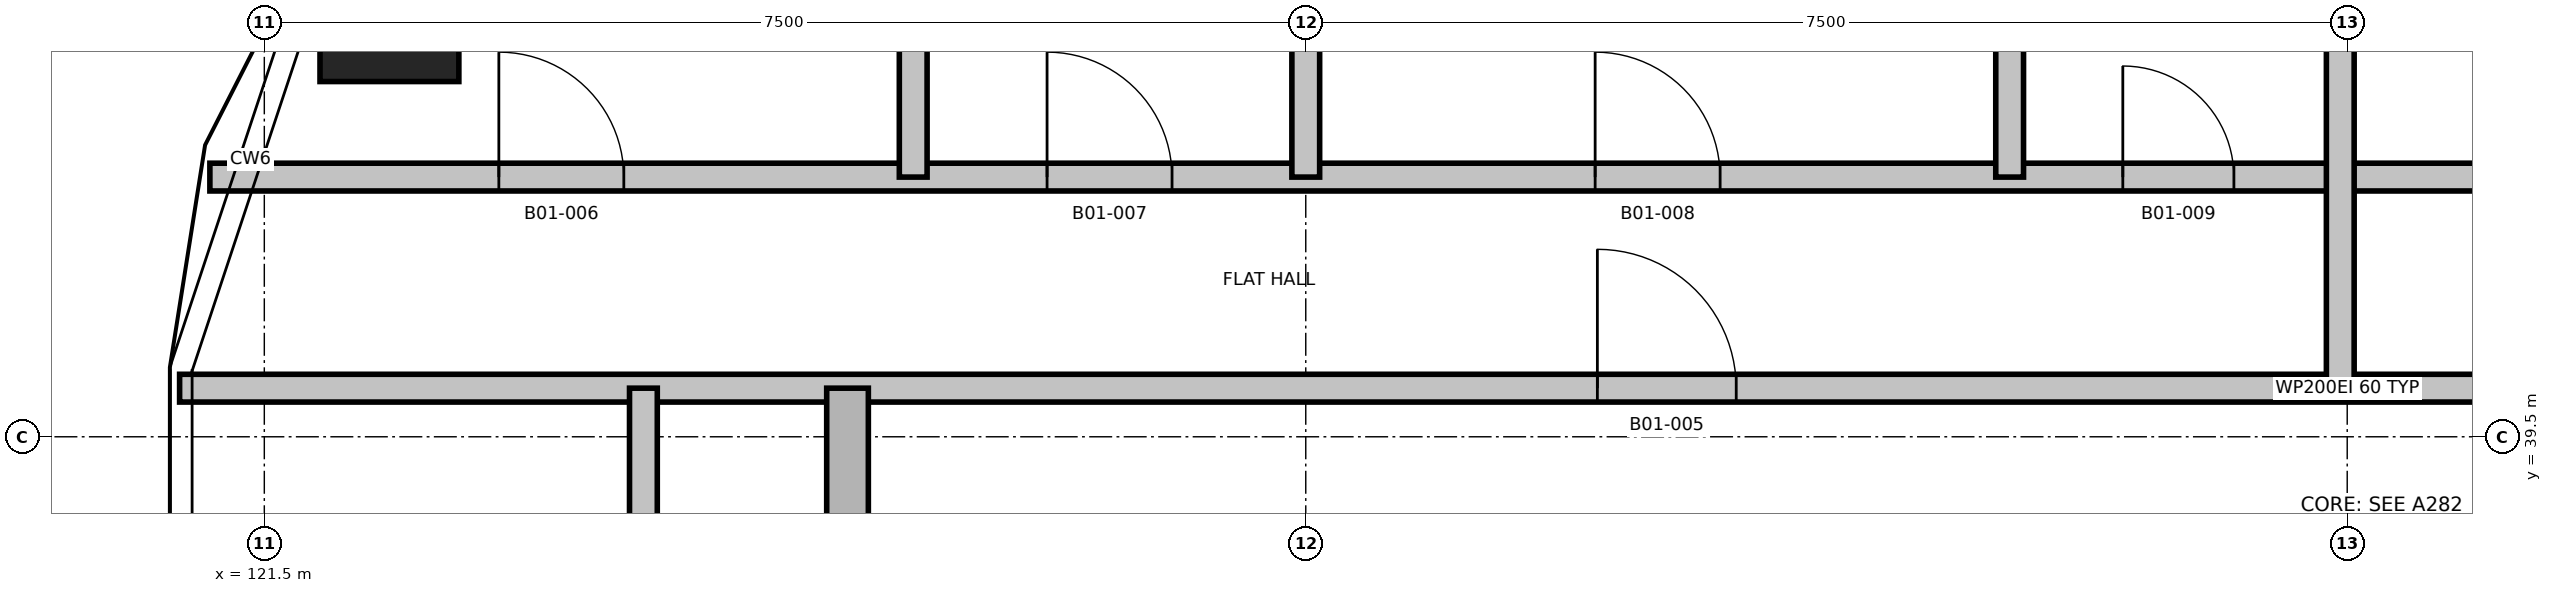
"""IFC4 building model, lengths in metres.
Left out: names, types, materials, properties, quantities, classifications, styles, units other than length and angle.
Written with IfcOpenShell. Run it as: python <this file> out.ifc"""

import sys

from ifc_helpers import new_model, si_unit, direction, frame, frame_2d, origin, origin_2d, place, context, subcontext, project, spatial, rectangle, extrude, element, fill, save


model = new_model("IFC4")
c1 = context("Model", 3, precision=1e-05, world=origin(), true_north=direction((0.0, 1.0)))
c2 = subcontext(c1, "Body", "Model", "MODEL_VIEW")
j1 = project(units=[si_unit("LENGTHUNIT", "METRE"), si_unit("PLANEANGLEUNIT", "RADIAN")], contexts=[c1])
p1 = place(None, origin())
s1 = spatial("IfcSite", under=j1, at=p1, CompositionType="ELEMENT")
p2 = place(p1, origin())
s2 = spatial("IfcBuilding", under=s1, at=p2, CompositionType="ELEMENT")
p3 = place(p2, frame((0.0, 0.0, 37.2)))
s3 = spatial("IfcBuildingStorey", under=s2, at=p3, CompositionType="ELEMENT", Elevation=37.2)
p4 = place(p3, frame((122.401, 42.558, 0.0), z_axis=(0.0, 0.0, 1.0), x_axis=(1.0, 0.0, 0.0)))
e1 = element("IfcColumn", 1, at=p4, inside=s3, PredefinedType="COLUMN", context=c2, shape_type="SweptSolid", body=[
    extrude(rectangle(XDim=1.0, YDim=1.0, at=origin_2d()), origin(), (0.0, 0.0, 1.0), 3.7),
])
p5 = place(p3, frame((120.89, 39.85, 0.0), z_axis=(0.0, 0.0, 1.0), x_axis=(1.0, 0.0, 0.0)))
e2 = element("IfcWall", 2, at=p5, inside=s3, PredefinedType="PARTITIONING", context=c2, shape_type="SweptSolid", body=[
    extrude(rectangle(XDim=31.22, YDim=0.2, at=frame_2d((15.61, 0.0))), origin(), (0.0, 0.0, 1.0), 3.4),
])
p6 = place(p5, frame((10.21, 0.0, 0.0)))
e3 = element("IfcOpeningElement", 3, at=p6, cuts=e2, PredefinedType="OPENING", context=c2, shape_type="SweptSolid", body=[
    extrude(rectangle(XDim=1.0, YDim=2.1, at=frame_2d((0.5, 1.05))), frame((0.0, 0.11, 0.0), z_axis=(0.0, -1.0, 0.0), x_axis=(1.0, 0.0, 0.0)), (0.0, 0.0, 1.0), 0.22),
])
p7 = place(p5, frame((20.01, 0.0, 0.0)))
e4 = element("IfcOpeningElement", 4, at=p7, cuts=e2, PredefinedType="OPENING", context=c2, shape_type="SweptSolid", body=[
    extrude(rectangle(XDim=1.0, YDim=2.1, at=frame_2d((0.5, 1.05))), frame((0.0, 0.11, 0.0), z_axis=(0.0, -1.0, 0.0), x_axis=(1.0, 0.0, 0.0)), (0.0, 0.0, 1.0), 0.22),
])
p8 = place(p3, frame((121.108, 41.37, 0.0), z_axis=(0.0, 0.0, 1.0), x_axis=(1.0, 0.0, 0.0)))
e5 = element("IfcWall", 5, at=p8, inside=s3, PredefinedType="PARTITIONING", context=c2, shape_type="SweptSolid", body=[
    extrude(rectangle(XDim=30.784, YDim=0.2, at=frame_2d((15.392, 0.0))), origin(), (0.0, 0.0, 1.0), 3.4),
])
p9 = place(p8, frame((2.081, 0.0, 0.0)))
e6 = element("IfcOpeningElement", 6, at=p9, cuts=e5, PredefinedType="OPENING", context=c2, shape_type="SweptSolid", body=[
    extrude(rectangle(XDim=0.9, YDim=2.1, at=frame_2d((0.45, 1.05))), frame((0.0, 0.11, 0.0), z_axis=(0.0, -1.0, 0.0), x_axis=(1.0, 0.0, 0.0)), (0.0, 0.0, 1.0), 0.22),
])
p10 = place(p8, frame((6.029, 0.0, 0.0)))
e7 = element("IfcOpeningElement", 7, at=p10, cuts=e5, PredefinedType="OPENING", context=c2, shape_type="SweptSolid", body=[
    extrude(rectangle(XDim=0.9, YDim=2.1, at=frame_2d((0.45, 1.05))), frame((0.0, 0.11, 0.0), z_axis=(0.0, -1.0, 0.0), x_axis=(1.0, 0.0, 0.0)), (0.0, 0.0, 1.0), 0.22),
])
p11 = place(p8, frame((9.976, 0.0, 0.0)))
e8 = element("IfcOpeningElement", 8, at=p11, cuts=e5, PredefinedType="OPENING", context=c2, shape_type="SweptSolid", body=[
    extrude(rectangle(XDim=0.9, YDim=2.1, at=frame_2d((0.45, 1.05))), frame((0.0, 0.11, 0.0), z_axis=(0.0, -1.0, 0.0), x_axis=(1.0, 0.0, 0.0)), (0.0, 0.0, 1.0), 0.22),
])
p12 = place(p8, frame((13.776, 0.0, 0.0)))
e9 = element("IfcOpeningElement", 9, at=p12, cuts=e5, PredefinedType="OPENING", context=c2, shape_type="SweptSolid", body=[
    extrude(rectangle(XDim=0.8, YDim=2.1, at=frame_2d((0.4, 1.05))), frame((0.0, 0.11, 0.0), z_axis=(0.0, -1.0, 0.0), x_axis=(1.0, 0.0, 0.0)), (0.0, 0.0, 1.0), 0.22),
])
p13 = place(p8, frame((17.409, 0.0, 0.0)))
e10 = element("IfcOpeningElement", 10, at=p13, cuts=e5, PredefinedType="OPENING", context=c2, shape_type="SweptSolid", body=[
    extrude(rectangle(XDim=0.9, YDim=2.1, at=frame_2d((0.45, 1.05))), frame((0.0, 0.11, 0.0), z_axis=(0.0, -1.0, 0.0), x_axis=(1.0, 0.0, 0.0)), (0.0, 0.0, 1.0), 0.22),
])
p14 = place(p8, frame((21.159, 0.0, 0.0)))
e11 = element("IfcOpeningElement", 11, at=p14, cuts=e5, PredefinedType="OPENING", context=c2, shape_type="SweptSolid", body=[
    extrude(rectangle(XDim=0.9, YDim=2.1, at=frame_2d((0.45, 1.05))), frame((0.0, 0.11, 0.0), z_axis=(0.0, -1.0, 0.0), x_axis=(1.0, 0.0, 0.0)), (0.0, 0.0, 1.0), 0.22),
])
p15 = place(p8, frame((23.219, 0.0, 0.0)))
e12 = element("IfcOpeningElement", 12, at=p15, cuts=e5, PredefinedType="OPENING", context=c2, shape_type="SweptSolid", body=[
    extrude(rectangle(XDim=0.8, YDim=2.1, at=frame_2d((0.4, 1.05))), frame((0.0, 0.11, 0.0), z_axis=(0.0, -1.0, 0.0), x_axis=(1.0, 0.0, 0.0)), (0.0, 0.0, 1.0), 0.22),
])
p16 = place(p8, frame((25.25, 0.0, 0.0)))
e13 = element("IfcOpeningElement", 13, at=p16, cuts=e5, PredefinedType="OPENING", context=c2, shape_type="SweptSolid", body=[
    extrude(rectangle(XDim=0.9, YDim=2.1, at=frame_2d((0.45, 1.05))), frame((0.0, 0.11, 0.0), z_axis=(0.0, -1.0, 0.0), x_axis=(1.0, 0.0, 0.0)), (0.0, 0.0, 1.0), 0.22),
])
p17 = place(p8, frame((27.97, 0.0, 0.0)))
e14 = element("IfcOpeningElement", 14, at=p17, cuts=e5, PredefinedType="OPENING", context=c2, shape_type="SweptSolid", body=[
    extrude(rectangle(XDim=0.9, YDim=2.1, at=frame_2d((0.45, 1.05))), frame((0.0, 0.11, 0.0), z_axis=(0.0, -1.0, 0.0), x_axis=(1.0, 0.0, 0.0)), (0.0, 0.0, 1.0), 0.22),
])
p18 = place(p3, frame((124.23, 22.15, 0.0), z_axis=(0.0, 0.0, 1.0), x_axis=(0.0, 1.0, 0.0)))
e15 = element("IfcWall", 15, at=p18, inside=s3, PredefinedType="PARTITIONING", context=c2, shape_type="SweptSolid", body=[
    extrude(rectangle(XDim=17.7, YDim=0.2, at=frame_2d((8.85, 0.0))), origin(), (0.0, 0.0, 1.0), 3.4),
])
p19 = place(p18, frame((1.028, 0.0, 0.0)))
e16 = element("IfcOpeningElement", 16, at=p19, cuts=e15, PredefinedType="OPENING", context=c2, shape_type="SweptSolid", body=[
    extrude(rectangle(XDim=0.9, YDim=2.1, at=frame_2d((0.45, 1.05))), frame((0.0, 0.11, 0.0), z_axis=(0.0, -1.0, 0.0), x_axis=(1.0, 0.0, 0.0)), (0.0, 0.0, 1.0), 0.22),
])
p20 = place(p18, frame((3.253, 0.0, 0.0)))
e17 = element("IfcOpeningElement", 17, at=p20, cuts=e15, PredefinedType="OPENING", context=c2, shape_type="SweptSolid", body=[
    extrude(rectangle(XDim=0.8, YDim=2.1, at=frame_2d((0.4, 1.05))), frame((0.0, 0.11, 0.0), z_axis=(0.0, -1.0, 0.0), x_axis=(1.0, 0.0, 0.0)), (0.0, 0.0, 1.0), 0.22),
])
p21 = place(p18, frame((6.867, 0.0, 0.0)))
e18 = element("IfcOpeningElement", 18, at=p21, cuts=e15, PredefinedType="OPENING", context=c2, shape_type="SweptSolid", body=[
    extrude(rectangle(XDim=0.9, YDim=2.1, at=frame_2d((0.45, 1.05))), frame((0.0, 0.11, 0.0), z_axis=(0.0, -1.0, 0.0), x_axis=(1.0, 0.0, 0.0)), (0.0, 0.0, 1.0), 0.22),
])
p22 = place(p18, frame((11.367, 0.0, 0.0)))
e19 = element("IfcOpeningElement", 19, at=p22, cuts=e15, PredefinedType="OPENING", context=c2, shape_type="SweptSolid", body=[
    extrude(rectangle(XDim=0.9, YDim=2.1, at=frame_2d((0.45, 1.05))), frame((0.0, 0.11, 0.0), z_axis=(0.0, -1.0, 0.0), x_axis=(1.0, 0.0, 0.0)), (0.0, 0.0, 1.0), 0.22),
])
p23 = place(p18, frame((15.075, 0.0, 0.0)))
e20 = element("IfcOpeningElement", 20, at=p23, cuts=e15, PredefinedType="OPENING", context=c2, shape_type="SweptSolid", body=[
    extrude(rectangle(XDim=0.9, YDim=2.1, at=frame_2d((0.45, 1.05))), frame((0.0, 0.11, 0.0), z_axis=(0.0, -1.0, 0.0), x_axis=(1.0, 0.0, 0.0)), (0.0, 0.0, 1.0), 0.22),
])
p24 = place(p3, frame((125.7, 22.15, 0.0), z_axis=(0.0, 0.0, 1.0), x_axis=(0.0, 1.0, 0.0)))
e21 = element("IfcWall", 21, at=p24, inside=s3, PredefinedType="SHEAR", context=c2, shape_type="SweptSolid", body=[
    extrude(rectangle(XDim=17.7, YDim=0.3, at=frame_2d((8.85, 0.0))), origin(), (0.0, 0.0, 1.0), 3.4),
])
p25 = place(p24, frame((2.7, 0.0, 0.0)))
e22 = element("IfcOpeningElement", 22, at=p25, cuts=e21, PredefinedType="OPENING", context=c2, shape_type="SweptSolid", body=[
    extrude(rectangle(XDim=1.0, YDim=2.1, at=frame_2d((0.5, 1.05))), frame((0.0, 0.16, 0.0), z_axis=(0.0, -1.0, 0.0), x_axis=(1.0, 0.0, 0.0)), (0.0, 0.0, 1.0), 0.32),
])
for number, where, z_axis, x_axis in (
    (23, (126.173, 41.37, 0.0), (0.0, 0.0, 1.0), (0.0, 1.0, 0.0)),
    (24, (129.0, 41.37, 0.0), (0.0, 0.0, 1.0), (0.0, 1.0, 0.0)),
    (25, (134.069, 41.37, 0.0), (0.0, 0.0, 1.0), (0.0, 1.0, 0.0)),
):
    element("IfcWall", number, at=place(p3, frame(where, z_axis=z_axis, x_axis=x_axis)), inside=s3, PredefinedType="PARTITIONING", context=c2, shape_type="SweptSolid", body=[
        extrude(rectangle(XDim=3.74, YDim=0.2, at=frame_2d((1.87, 0.0))), origin(), (0.0, 0.0, 1.0), 3.4),
    ])
p26 = place(p3, frame((136.45, 39.85, 0.0), z_axis=(0.0, 0.0, 1.0), x_axis=(0.0, 1.0, 0.0)))
e26 = element("IfcWall", 26, at=p26, inside=s3, PredefinedType="PARTITIONING", context=c2, shape_type="SweptSolid", body=[
    extrude(rectangle(XDim=5.26, YDim=0.2, at=frame_2d((2.63, 0.0))), origin(), (0.0, 0.0, 1.0), 3.4),
])
p27 = place(p6, origin())
e27 = element("IfcDoor", 27, at=p27, inside=s3, OperationType="SINGLE_SWING_LEFT", PredefinedType="DOOR", context=c2, shape_type="SweptSolid", body=[
    extrude(rectangle(XDim=1.0, YDim=2.1, at=frame_2d((0.5, 1.05))), frame((0.0, 0.025, 0.0), z_axis=(0.0, -1.0, 0.0), x_axis=(1.0, 0.0, 0.0)), (0.0, 0.0, 1.0), 0.05),
])
fill(e3, e27)
p28 = place(p9, origin())
e28 = element("IfcDoor", 28, at=p28, inside=s3, OperationType="SINGLE_SWING_RIGHT", PredefinedType="DOOR", context=c2, shape_type="SweptSolid", body=[
    extrude(rectangle(XDim=0.9, YDim=2.1, at=frame_2d((0.45, 1.05))), frame((0.0, 0.025, 0.0), z_axis=(0.0, -1.0, 0.0), x_axis=(1.0, 0.0, 0.0)), (0.0, 0.0, 1.0), 0.05),
])
fill(e6, e28)
p29 = place(p10, origin())
e29 = element("IfcDoor", 29, at=p29, inside=s3, OperationType="SINGLE_SWING_LEFT", PredefinedType="DOOR", context=c2, shape_type="SweptSolid", body=[
    extrude(rectangle(XDim=0.9, YDim=2.1, at=frame_2d((0.45, 1.05))), frame((0.0, 0.025, 0.0), z_axis=(0.0, -1.0, 0.0), x_axis=(1.0, 0.0, 0.0)), (0.0, 0.0, 1.0), 0.05),
])
fill(e7, e29)
p30 = place(p11, origin())
e30 = element("IfcDoor", 30, at=p30, inside=s3, OperationType="SINGLE_SWING_RIGHT", PredefinedType="DOOR", context=c2, shape_type="SweptSolid", body=[
    extrude(rectangle(XDim=0.9, YDim=2.1, at=frame_2d((0.45, 1.05))), frame((0.0, 0.025, 0.0), z_axis=(0.0, -1.0, 0.0), x_axis=(1.0, 0.0, 0.0)), (0.0, 0.0, 1.0), 0.05),
])
fill(e8, e30)
p31 = place(p12, origin())
e31 = element("IfcDoor", 31, at=p31, inside=s3, OperationType="SINGLE_SWING_LEFT", PredefinedType="DOOR", context=c2, shape_type="SweptSolid", body=[
    extrude(rectangle(XDim=0.8, YDim=2.1, at=frame_2d((0.4, 1.05))), frame((0.0, 0.025, 0.0), z_axis=(0.0, -1.0, 0.0), x_axis=(1.0, 0.0, 0.0)), (0.0, 0.0, 1.0), 0.05),
])
fill(e9, e31)
save(model, sys.argv[1])
